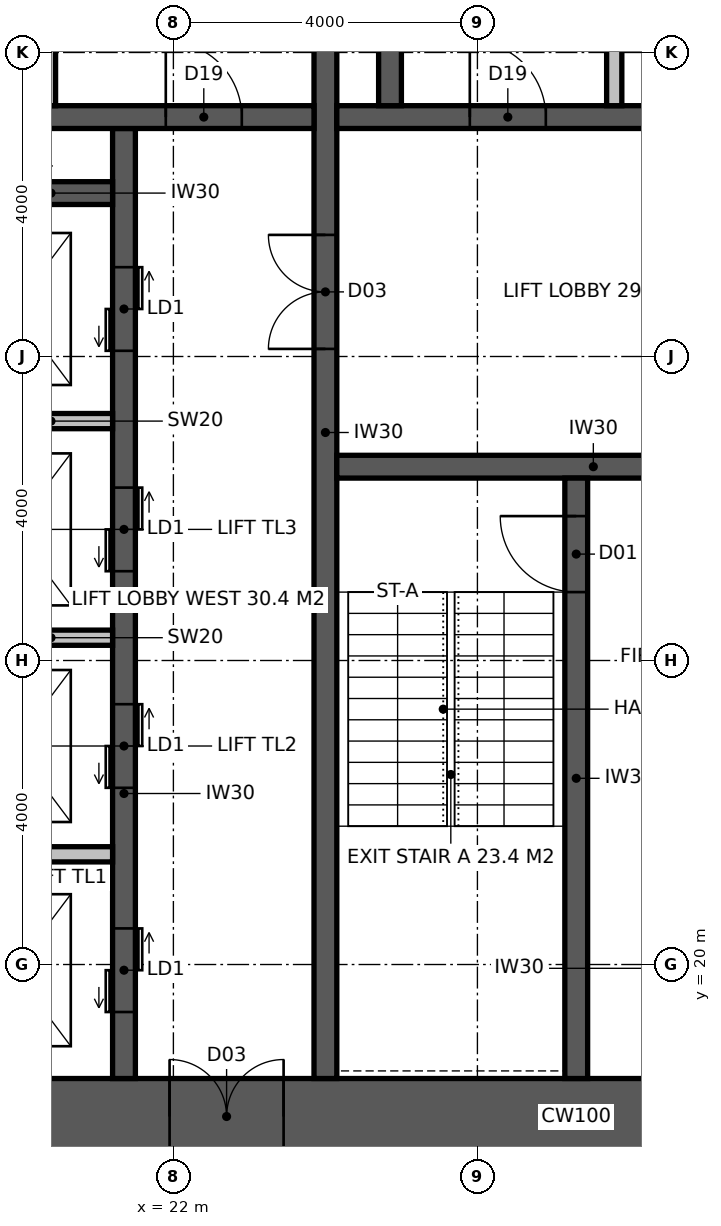
"""IFC4 building model, lengths in metres.
Left out: names, types, materials, properties, quantities, classifications, styles, units other than length and angle.
Written with IfcOpenShell. Run it as: python <this file> out.ifc"""

import sys

from ifc_helpers import new_model, si_unit, direction, frame, frame_2d, origin, place, context, subcontext, project, spatial, rectangle, extrude, element, fill, save


model = new_model("IFC4")
c1 = context("Model", 3, precision=1e-05, world=origin(), true_north=direction((0.0, 1.0)))
c2 = subcontext(c1, "Body", "Model", "MODEL_VIEW")
j1 = project(units=[si_unit("LENGTHUNIT", "METRE"), si_unit("PLANEANGLEUNIT", "RADIAN")], contexts=[c1])
p1 = place(None, origin())
s1 = spatial("IfcSite", under=j1, at=p1, CompositionType="ELEMENT")
p2 = place(p1, origin())
s2 = spatial("IfcBuilding", under=s1, at=p2, CompositionType="ELEMENT")
p3 = place(p2, frame((0.0, 0.0, 226.2)))
s3 = spatial("IfcBuildingStorey", under=s2, at=p3, CompositionType="ELEMENT", Elevation=226.2)
p4 = place(p3, frame((18.5, 18.0, -0.15), z_axis=(0.0, 0.0, 1.0), x_axis=(1.0, 0.0, 0.0)))
e1 = element("IfcWall", 1, at=p4, inside=s3, PredefinedType="SHEAR", context=c2, shape_type="SweptSolid", body=[
    extrude(rectangle(XDim=17.6, YDim=1.0, at=frame_2d((8.8, 0.0))), origin(), (0.0, 0.0, 1.0), 4.0),
])
p5 = place(p4, frame((3.45, 0.0, 0.15)))
e2 = element("IfcOpeningElement", 2, at=p5, cuts=e1, PredefinedType="OPENING", context=c2, shape_type="SweptSolid", body=[
    extrude(rectangle(XDim=1.5, YDim=2.4, at=frame_2d((0.75, 1.2))), frame((0.0, 0.51, 0.0), z_axis=(0.0, -1.0, 0.0), x_axis=(1.0, 0.0, 0.0)), (0.0, 0.0, 1.0), 1.02),
])
p6 = place(p3, frame((24.0, 18.5, -0.15), z_axis=(0.0, 0.0, 1.0), x_axis=(0.0, 1.0, 0.0)))
e3 = element("IfcWall", 3, at=p6, inside=s3, PredefinedType="SHEAR", context=c2, shape_type="SweptSolid", body=[
    extrude(rectangle(XDim=17.0, YDim=0.3, at=frame_2d((8.5, 0.0))), origin(), (0.0, 0.0, 1.0), 4.0),
])
p7 = place(p6, frame((9.6, 0.0, 0.15)))
e4 = element("IfcOpeningElement", 4, at=p7, cuts=e3, PredefinedType="OPENING", context=c2, shape_type="SweptSolid", body=[
    extrude(rectangle(XDim=1.5, YDim=2.4, at=frame_2d((0.75, 1.2))), frame((0.0, 0.16, 0.0), z_axis=(0.0, -1.0, 0.0), x_axis=(1.0, 0.0, 0.0)), (0.0, 0.0, 1.0), 0.32),
])
p8 = place(p3, frame((24.15, 26.55, -0.15), z_axis=(0.0, 0.0, 1.0), x_axis=(1.0, 0.0, 0.0)))
e5 = element("IfcWall", 5, at=p8, inside=s3, PredefinedType="SHEAR", context=c2, shape_type="SweptSolid", body=[
    extrude(rectangle(XDim=11.25, YDim=0.3, at=frame_2d((5.625, 0.0))), origin(), (0.0, 0.0, 1.0), 4.0),
])
p9 = place(p8, frame((9.25, 0.0, 0.15)))
e6 = element("IfcOpeningElement", 6, at=p9, cuts=e5, PredefinedType="OPENING", context=c2, shape_type="SweptSolid", body=[
    extrude(rectangle(XDim=1.0, YDim=2.2, at=frame_2d((0.5, 1.1))), frame((0.0, 0.16, 0.0), z_axis=(0.0, -1.0, 0.0), x_axis=(1.0, 0.0, 0.0)), (0.0, 0.0, 1.0), 0.32),
])
p10 = place(p8, frame((4.9, 0.0, 0.15)))
e7 = element("IfcOpeningElement", 7, at=p10, cuts=e5, PredefinedType="OPENING", context=c2, shape_type="SweptSolid", body=[
    extrude(rectangle(XDim=1.5, YDim=2.4, at=frame_2d((0.75, 1.2))), frame((0.0, 0.16, 0.0), z_axis=(0.0, -1.0, 0.0), x_axis=(1.0, 0.0, 0.0)), (0.0, 0.0, 1.0), 0.32),
])
p11 = place(p3, frame((27.3, 18.5, -0.15), z_axis=(0.0, 0.0, 1.0), x_axis=(0.0, 1.0, 0.0)))
e8 = element("IfcWall", 8, at=p11, inside=s3, PredefinedType="SHEAR", context=c2, shape_type="SweptSolid", body=[
    extrude(rectangle(XDim=7.9, YDim=0.3, at=frame_2d((3.95, 0.0))), origin(), (0.0, 0.0, 1.0), 4.0),
])
p12 = place(p11, frame((6.4, 0.0, 0.15)))
e9 = element("IfcOpeningElement", 9, at=p12, cuts=e8, PredefinedType="OPENING", context=c2, shape_type="SweptSolid", body=[
    extrude(rectangle(XDim=1.0, YDim=2.2, at=frame_2d((0.5, 1.1))), frame((0.0, 0.16, 0.0), z_axis=(0.0, -1.0, 0.0), x_axis=(1.0, 0.0, 0.0)), (0.0, 0.0, 1.0), 0.32),
])
p13 = place(p3, frame((24.15, 31.15, -0.15), z_axis=(0.0, 0.0, 1.0), x_axis=(1.0, 0.0, 0.0)))
e10 = element("IfcWall", 10, at=p13, inside=s3, PredefinedType="SHEAR", context=c2, shape_type="SweptSolid", body=[
    extrude(rectangle(XDim=11.25, YDim=0.3, at=frame_2d((5.625, 0.0))), origin(), (0.0, 0.0, 1.0), 4.0),
])
p14 = place(p13, frame((1.75, 0.0, 0.15)))
e11 = element("IfcOpeningElement", 11, at=p14, cuts=e10, PredefinedType="OPENING", context=c2, shape_type="SweptSolid", body=[
    extrude(rectangle(XDim=1.0, YDim=2.2, at=frame_2d((0.5, 1.1))), frame((0.0, 0.16, 0.0), z_axis=(0.0, -1.0, 0.0), x_axis=(1.0, 0.0, 0.0)), (0.0, 0.0, 1.0), 0.32),
])
p15 = place(p13, frame((4.55, 0.0, 0.15)))
e12 = element("IfcOpeningElement", 12, at=p15, cuts=e10, PredefinedType="OPENING", context=c2, shape_type="SweptSolid", body=[
    extrude(rectangle(XDim=1.0, YDim=2.2, at=frame_2d((0.5, 1.1))), frame((0.0, 0.16, 0.0), z_axis=(0.0, -1.0, 0.0), x_axis=(1.0, 0.0, 0.0)), (0.0, 0.0, 1.0), 0.32),
])
p16 = place(p13, frame((7.25, 0.0, 0.15)))
e13 = element("IfcOpeningElement", 13, at=p16, cuts=e10, PredefinedType="OPENING", context=c2, shape_type="SweptSolid", body=[
    extrude(rectangle(XDim=1.4, YDim=2.4, at=frame_2d((0.7, 1.2))), frame((0.0, 0.16, 0.0), z_axis=(0.0, -1.0, 0.0), x_axis=(1.0, 0.0, 0.0)), (0.0, 0.0, 1.0), 0.32),
])
p17 = place(p3, frame((21.35, 18.5, -0.15), z_axis=(0.0, 0.0, 1.0), x_axis=(0.0, 1.0, 0.0)))
e14 = element("IfcWall", 14, at=p17, inside=s3, PredefinedType="SHEAR", context=c2, shape_type="SweptSolid", body=[
    extrude(rectangle(XDim=12.5, YDim=0.3, at=frame_2d((6.25, 0.0))), origin(), (0.0, 0.0, 1.0), 4.0),
])
p18 = place(p17, frame((0.875, 0.0, 0.15)))
e15 = element("IfcOpeningElement", 15, at=p18, cuts=e14, PredefinedType="OPENING", context=c2, shape_type="SweptSolid", body=[
    extrude(rectangle(XDim=1.1, YDim=2.2, at=frame_2d((0.55, 1.1))), frame((0.0, 0.16, 0.0), z_axis=(0.0, -1.0, 0.0), x_axis=(1.0, 0.0, 0.0)), (0.0, 0.0, 1.0), 0.32),
])
p19 = place(p17, frame((3.825, 0.0, 0.15)))
e16 = element("IfcOpeningElement", 16, at=p19, cuts=e14, PredefinedType="OPENING", context=c2, shape_type="SweptSolid", body=[
    extrude(rectangle(XDim=1.1, YDim=2.2, at=frame_2d((0.55, 1.1))), frame((0.0, 0.16, 0.0), z_axis=(0.0, -1.0, 0.0), x_axis=(1.0, 0.0, 0.0)), (0.0, 0.0, 1.0), 0.32),
])
p20 = place(p17, frame((6.675, 0.0, 0.15)))
e17 = element("IfcOpeningElement", 17, at=p20, cuts=e14, PredefinedType="OPENING", context=c2, shape_type="SweptSolid", body=[
    extrude(rectangle(XDim=1.1, YDim=2.2, at=frame_2d((0.55, 1.1))), frame((0.0, 0.16, 0.0), z_axis=(0.0, -1.0, 0.0), x_axis=(1.0, 0.0, 0.0)), (0.0, 0.0, 1.0), 0.32),
])
p21 = place(p17, frame((9.575, 0.0, 0.15)))
e18 = element("IfcOpeningElement", 18, at=p21, cuts=e14, PredefinedType="OPENING", context=c2, shape_type="SweptSolid", body=[
    extrude(rectangle(XDim=1.1, YDim=2.2, at=frame_2d((0.55, 1.1))), frame((0.0, 0.16, 0.0), z_axis=(0.0, -1.0, 0.0), x_axis=(1.0, 0.0, 0.0)), (0.0, 0.0, 1.0), 0.32),
])
p22 = place(p3, frame((18.5, 31.15, -0.15), z_axis=(0.0, 0.0, 1.0), x_axis=(1.0, 0.0, 0.0)))
e19 = element("IfcWall", 19, at=p22, inside=s3, PredefinedType="SHEAR", context=c2, shape_type="SweptSolid", body=[
    extrude(rectangle(XDim=5.35, YDim=0.3, at=frame_2d((2.675, 0.0))), origin(), (0.0, 0.0, 1.0), 4.0),
])
p23 = place(p22, frame((3.4, 0.0, 0.15)))
e20 = element("IfcOpeningElement", 20, at=p23, cuts=e19, PredefinedType="OPENING", context=c2, shape_type="SweptSolid", body=[
    extrude(rectangle(XDim=1.0, YDim=2.2, at=frame_2d((0.5, 1.1))), frame((0.0, 0.16, 0.0), z_axis=(0.0, -1.0, 0.0), x_axis=(1.0, 0.0, 0.0)), (0.0, 0.0, 1.0), 0.32),
])
p24 = place(p3, frame((18.5, 30.15, -0.15), z_axis=(0.0, 0.0, 1.0), x_axis=(1.0, 0.0, 0.0)))
e21 = element("IfcWall", 21, at=p24, inside=s3, PredefinedType="SHEAR", context=c2, shape_type="SweptSolid", body=[
    extrude(rectangle(XDim=2.7, YDim=0.3, at=frame_2d((1.35, 0.0))), origin(), (0.0, 0.0, 1.0), 4.0),
])
p25 = place(p3, frame((24.85, 31.3, -0.15), z_axis=(0.0, 0.0, 1.0), x_axis=(0.0, 1.0, 0.0)))
e22 = element("IfcWall", 22, at=p25, inside=s3, PredefinedType="SHEAR", context=c2, shape_type="SweptSolid", body=[
    extrude(rectangle(XDim=4.2, YDim=0.3, at=frame_2d((2.1, 0.0))), origin(), (0.0, 0.0, 1.0), 4.0),
])
p26 = place(p3, frame((27.8, 31.3, 0.0), z_axis=(0.0, 0.0, 1.0), x_axis=(0.0, 1.0, 0.0)))
e23 = element("IfcWall", 23, at=p26, inside=s3, PredefinedType="SOLIDWALL", context=c2, shape_type="SweptSolid", body=[
    extrude(rectangle(XDim=2.8, YDim=0.2, at=frame_2d((1.4, 0.0))), origin(), (0.0, 0.0, 1.0), 3.85),
])
for number, where, z_axis, x_axis in (
    (24, (18.5, 21.45, -0.15), (0.0, 0.0, 1.0), (1.0, 0.0, 0.0)),
    (25, (18.5, 24.3, -0.15), (0.0, 0.0, 1.0), (1.0, 0.0, 0.0)),
    (26, (18.5, 27.15, -0.15), (0.0, 0.0, 1.0), (1.0, 0.0, 0.0)),
):
    element("IfcWall", number, at=place(p3, frame(where, z_axis=z_axis, x_axis=x_axis)), inside=s3, PredefinedType="SOLIDWALL", context=c2, shape_type="SweptSolid", body=[
        extrude(rectangle(XDim=2.7, YDim=0.2, at=frame_2d((1.35, 0.0))), origin(), (0.0, 0.0, 1.0), 4.0),
    ])
p27 = place(p3, frame((20.4, 31.3, 0.0), z_axis=(0.0, 0.0, 1.0), x_axis=(0.0, 1.0, 0.0)))
e27 = element("IfcWall", 27, at=p27, inside=s3, PredefinedType="PARTITIONING", context=c2, shape_type="SweptSolid", body=[
    extrude(rectangle(XDim=4.2, YDim=0.1, at=frame_2d((2.1, 0.0))), origin(), (0.0, 0.0, 1.0), 3.85),
])
p28 = place(p27, frame((1.55, 0.0, 0.0)))
e28 = element("IfcOpeningElement", 28, at=p28, cuts=e27, PredefinedType="OPENING", context=c2, shape_type="SweptSolid", body=[
    extrude(rectangle(XDim=1.0, YDim=2.2, at=frame_2d((0.5, 1.1))), frame((0.0, 0.06, 0.0), z_axis=(0.0, -1.0, 0.0), x_axis=(1.0, 0.0, 0.0)), (0.0, 0.0, 1.0), 0.12),
])
p29 = place(p12, origin())
e29 = element("IfcDoor", 29, at=p29, inside=s3, OperationType="SINGLE_SWING_RIGHT", PredefinedType="DOOR", context=c2, shape_type="SweptSolid", body=[
    extrude(rectangle(XDim=1.0, YDim=2.2, at=frame_2d((0.5, 1.1))), frame((0.0, 0.025, 0.0), z_axis=(0.0, -1.0, 0.0), x_axis=(1.0, 0.0, 0.0)), (0.0, 0.0, 1.0), 0.05),
])
fill(e9, e29)
p30 = place(p7, origin())
e30 = element("IfcDoor", 30, at=p30, inside=s3, OperationType="DOUBLE_DOOR_DOUBLE_SWING", PredefinedType="DOOR", context=c2, shape_type="SweptSolid", body=[
    extrude(rectangle(XDim=1.5, YDim=2.4, at=frame_2d((0.75, 1.2))), frame((0.0, 0.025, 0.0), z_axis=(0.0, -1.0, 0.0), x_axis=(1.0, 0.0, 0.0)), (0.0, 0.0, 1.0), 0.05),
])
fill(e4, e30)
p31 = place(p23, origin())
e31 = element("IfcDoor", 31, at=p31, inside=s3, OperationType="SINGLE_SWING_LEFT", PredefinedType="DOOR", context=c2, shape_type="SweptSolid", body=[
    extrude(rectangle(XDim=1.0, YDim=2.2, at=frame_2d((0.5, 1.1))), frame((0.0, 0.025, 0.0), z_axis=(0.0, -1.0, 0.0), x_axis=(1.0, 0.0, 0.0)), (0.0, 0.0, 1.0), 0.05),
])
fill(e20, e31)
p32 = place(p14, origin())
e32 = element("IfcDoor", 32, at=p32, inside=s3, OperationType="SINGLE_SWING_LEFT", PredefinedType="DOOR", context=c2, shape_type="SweptSolid", body=[
    extrude(rectangle(XDim=1.0, YDim=2.2, at=frame_2d((0.5, 1.1))), frame((0.0, 0.025, 0.0), z_axis=(0.0, -1.0, 0.0), x_axis=(1.0, 0.0, 0.0)), (0.0, 0.0, 1.0), 0.05),
])
fill(e11, e32)
p33 = place(p5, origin())
e33 = element("IfcDoor", 33, at=p33, inside=s3, OperationType="DOUBLE_DOOR_DOUBLE_SWING", PredefinedType="DOOR", context=c2, shape_type="SweptSolid", body=[
    extrude(rectangle(XDim=1.5, YDim=2.4, at=frame_2d((0.75, 1.2))), frame((0.0, 0.025, 0.0), z_axis=(0.0, -1.0, 0.0), x_axis=(1.0, 0.0, 0.0)), (0.0, 0.0, 1.0), 0.05),
])
fill(e2, e33)
p34 = place(p18, origin())
e34 = element("IfcDoor", 34, at=p34, inside=s3, OperationType="DOUBLE_DOOR_SLIDING", PredefinedType="DOOR", context=c2, shape_type="SweptSolid", body=[
    extrude(rectangle(XDim=1.1, YDim=2.2, at=frame_2d((0.55, 1.1))), frame((0.0, 0.025, 0.0), z_axis=(0.0, -1.0, 0.0), x_axis=(1.0, 0.0, 0.0)), (0.0, 0.0, 1.0), 0.05),
])
fill(e15, e34)
p35 = place(p19, origin())
e35 = element("IfcDoor", 35, at=p35, inside=s3, OperationType="DOUBLE_DOOR_SLIDING", PredefinedType="DOOR", context=c2, shape_type="SweptSolid", body=[
    extrude(rectangle(XDim=1.1, YDim=2.2, at=frame_2d((0.55, 1.1))), frame((0.0, 0.025, 0.0), z_axis=(0.0, -1.0, 0.0), x_axis=(1.0, 0.0, 0.0)), (0.0, 0.0, 1.0), 0.05),
])
fill(e16, e35)
p36 = place(p20, origin())
e36 = element("IfcDoor", 36, at=p36, inside=s3, OperationType="DOUBLE_DOOR_SLIDING", PredefinedType="DOOR", context=c2, shape_type="SweptSolid", body=[
    extrude(rectangle(XDim=1.1, YDim=2.2, at=frame_2d((0.55, 1.1))), frame((0.0, 0.025, 0.0), z_axis=(0.0, -1.0, 0.0), x_axis=(1.0, 0.0, 0.0)), (0.0, 0.0, 1.0), 0.05),
])
fill(e17, e36)
p37 = place(p21, origin())
e37 = element("IfcDoor", 37, at=p37, inside=s3, OperationType="DOUBLE_DOOR_SLIDING", PredefinedType="DOOR", context=c2, shape_type="SweptSolid", body=[
    extrude(rectangle(XDim=1.1, YDim=2.2, at=frame_2d((0.55, 1.1))), frame((0.0, 0.025, 0.0), z_axis=(0.0, -1.0, 0.0), x_axis=(1.0, 0.0, 0.0)), (0.0, 0.0, 1.0), 0.05),
])
fill(e18, e37)
save(model, sys.argv[1])
